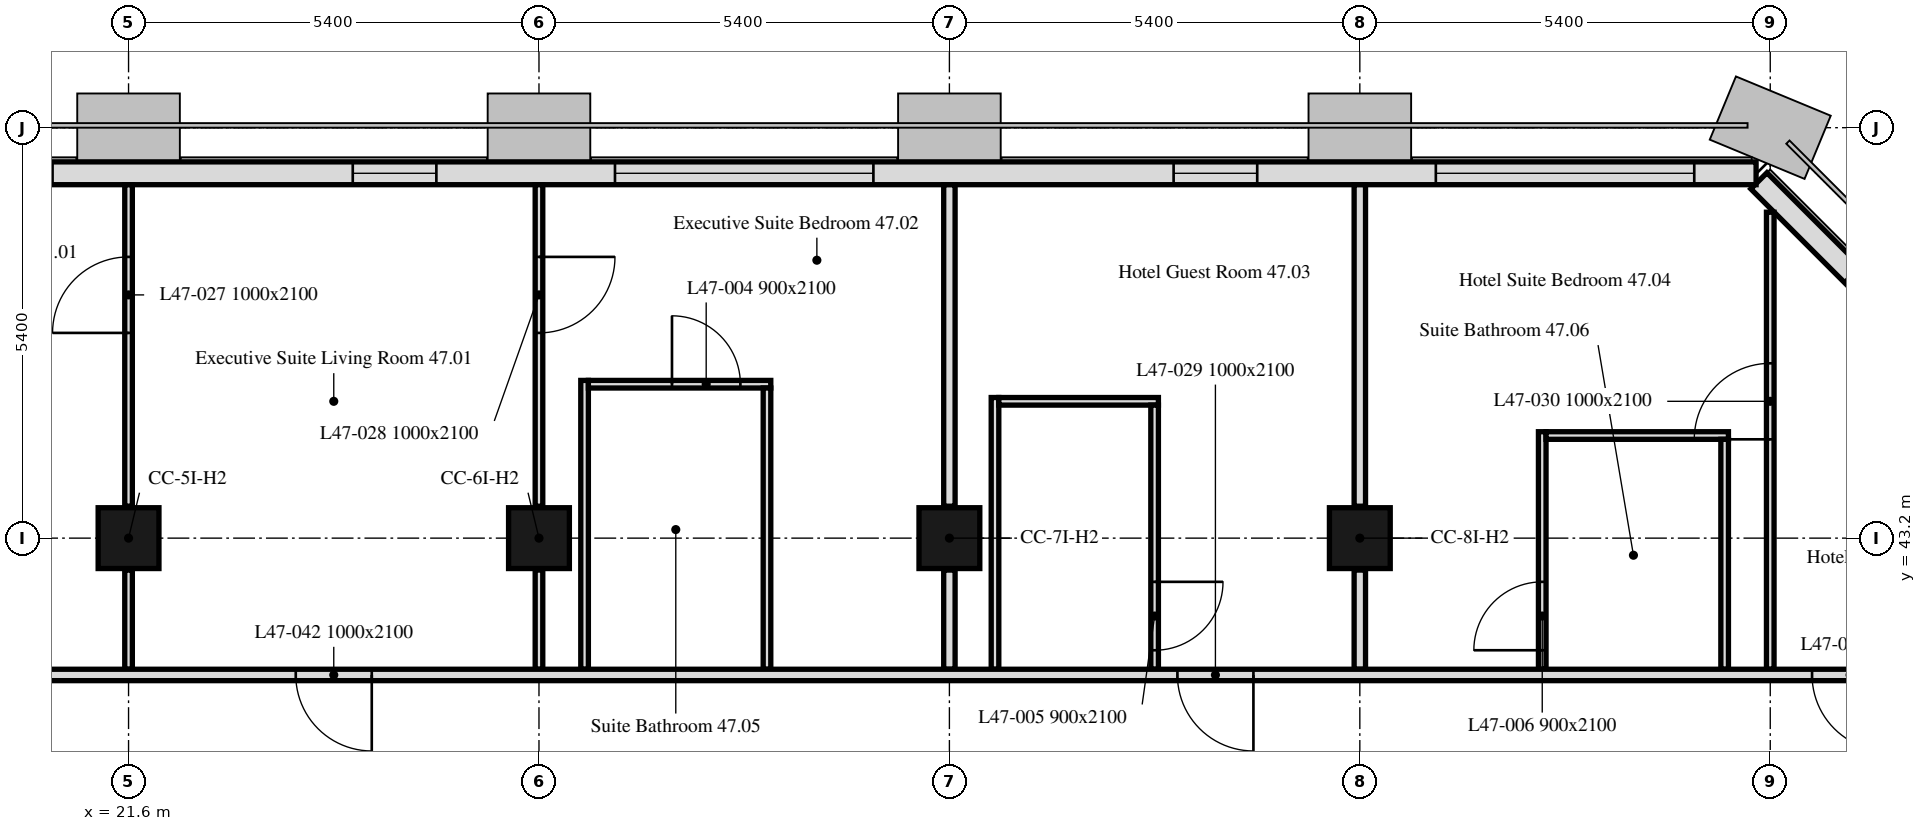
"""IFC4 building model, lengths in metres.
Left out: names, types, materials, properties, quantities, classifications, styles, units other than length and angle.
Written with IfcOpenShell. Run it as: python <this file> out.ifc"""

import sys

from ifc_helpers import new_model, si_unit, direction, frame, frame_2d, origin, origin_2d, place, context, subcontext, project, spatial, rectangle, extrude, element, fill, save


model = new_model("IFC4")
c1 = context("Model", 3, precision=1e-05, world=origin(), true_north=direction((0.0, 1.0)))
c2 = subcontext(c1, "Body", "Model", "MODEL_VIEW")
j1 = project(units=[si_unit("LENGTHUNIT", "METRE"), si_unit("PLANEANGLEUNIT", "RADIAN")], contexts=[c1])
p1 = place(None, origin())
s1 = spatial("IfcSite", under=j1, at=p1, CompositionType="ELEMENT")
p2 = place(p1, origin())
s2 = spatial("IfcBuilding", under=s1, at=p2, CompositionType="ELEMENT")
p3 = place(p2, frame((0.0, 0.0, 193.9)))
s3 = spatial("IfcBuildingStorey", under=s2, at=p3, CompositionType="ELEMENT", Elevation=193.9)
for number, where, z_axis, x_axis in (
    (1, (21.6, 43.2, 0.0), (0.0, 0.0, 1.0), (1.0, 0.0, 0.0)),
    (2, (27.0, 43.2, 0.0), (0.0, 0.0, 1.0), (1.0, 0.0, 0.0)),
    (3, (32.4, 43.2, 0.0), (0.0, 0.0, 1.0), (1.0, 0.0, 0.0)),
    (4, (37.8, 43.2, 0.0), (0.0, 0.0, 1.0), (1.0, 0.0, 0.0)),
):
    element("IfcColumn", number, at=place(p3, frame(where, z_axis=z_axis, x_axis=x_axis)), inside=s3, PredefinedType="COLUMN", context=c2, shape_type="SweptSolid", body=[
        extrude(rectangle(XDim=0.8, YDim=0.8, at=origin_2d()), origin(), (0.0, 0.0, 1.0), 3.0),
    ])
p4 = place(p3, frame((47.901, 43.051, 0.0), z_axis=(0.0, 0.0, 1.0), x_axis=(-0.707106781187, 0.707106781187, 0.0)))
e5 = element("IfcWall", 5, at=p4, inside=s3, PredefinedType="SOLIDWALL", context=c2, shape_type="SweptSolid", body=[
    extrude(rectangle(XDim=6.86, YDim=0.3, at=frame_2d((3.43, 0.0))), origin(), (0.0, 0.0, 1.0), 3.0),
])
p5 = place(p4, frame((1.73, 0.0, 0.9)))
e6 = element("IfcOpeningElement", 6, at=p5, cuts=e5, PredefinedType="OPENING", context=c2, shape_type="SweptSolid", body=[
    extrude(rectangle(XDim=3.4, YDim=1.7, at=frame_2d((1.7, 0.85))), frame((0.0, 0.16, 0.0), z_axis=(0.0, -1.0, 0.0), x_axis=(1.0, 0.0, 0.0)), (0.0, 0.0, 1.0), 0.32),
])
p6 = place(p3, frame((43.014, 48.0, 0.0), z_axis=(0.0, 0.0, 1.0), x_axis=(-1.0, 0.0, 0.0)))
e7 = element("IfcWall", 7, at=p6, inside=s3, PredefinedType="SOLIDWALL", context=c2, shape_type="SweptSolid", body=[
    extrude(rectangle(XDim=32.027, YDim=0.3, at=frame_2d((16.014, 0.0))), origin(), (0.0, 0.0, 1.0), 3.0),
])
p7 = place(p6, frame((0.814, 0.0, 0.9)))
e8 = element("IfcOpeningElement", 8, at=p7, cuts=e7, PredefinedType="OPENING", context=c2, shape_type="SweptSolid", body=[
    extrude(rectangle(XDim=3.4, YDim=1.7, at=frame_2d((1.7, 0.85))), frame((0.0, 0.16, 0.0), z_axis=(0.0, -1.0, 0.0), x_axis=(1.0, 0.0, 0.0)), (0.0, 0.0, 1.0), 0.32),
])
p8 = place(p6, frame((6.564, 0.0, 0.9)))
e9 = element("IfcOpeningElement", 9, at=p8, cuts=e7, PredefinedType="OPENING", context=c2, shape_type="SweptSolid", body=[
    extrude(rectangle(XDim=1.1, YDim=1.7, at=frame_2d((0.55, 0.85))), frame((0.0, 0.16, 0.0), z_axis=(0.0, -1.0, 0.0), x_axis=(1.0, 0.0, 0.0)), (0.0, 0.0, 1.0), 0.32),
])
p9 = place(p6, frame((11.614, 0.0, 0.9)))
e10 = element("IfcOpeningElement", 10, at=p9, cuts=e7, PredefinedType="OPENING", context=c2, shape_type="SweptSolid", body=[
    extrude(rectangle(XDim=3.4, YDim=1.7, at=frame_2d((1.7, 0.85))), frame((0.0, 0.16, 0.0), z_axis=(0.0, -1.0, 0.0), x_axis=(1.0, 0.0, 0.0)), (0.0, 0.0, 1.0), 0.32),
])
p10 = place(p6, frame((17.364, 0.0, 0.9)))
e11 = element("IfcOpeningElement", 11, at=p10, cuts=e7, PredefinedType="OPENING", context=c2, shape_type="SweptSolid", body=[
    extrude(rectangle(XDim=1.1, YDim=1.7, at=frame_2d((0.55, 0.85))), frame((0.0, 0.16, 0.0), z_axis=(0.0, -1.0, 0.0), x_axis=(1.0, 0.0, 0.0)), (0.0, 0.0, 1.0), 0.32),
])
p11 = place(p6, frame((22.414, 0.0, 0.9)))
e12 = element("IfcOpeningElement", 12, at=p11, cuts=e7, PredefinedType="OPENING", context=c2, shape_type="SweptSolid", body=[
    extrude(rectangle(XDim=3.4, YDim=1.7, at=frame_2d((1.7, 0.85))), frame((0.0, 0.16, 0.0), z_axis=(0.0, -1.0, 0.0), x_axis=(1.0, 0.0, 0.0)), (0.0, 0.0, 1.0), 0.32),
])
p12 = place(p6, frame((28.164, 0.0, 0.9)))
e13 = element("IfcOpeningElement", 13, at=p12, cuts=e7, PredefinedType="OPENING", context=c2, shape_type="SweptSolid", body=[
    extrude(rectangle(XDim=1.1, YDim=1.7, at=frame_2d((0.55, 0.85))), frame((0.0, 0.16, 0.0), z_axis=(0.0, -1.0, 0.0), x_axis=(1.0, 0.0, 0.0)), (0.0, 0.0, 1.0), 0.32),
])
p13 = place(p3, frame((21.6, 41.475, 0.0), z_axis=(0.0, 0.0, 1.0), x_axis=(0.0, 1.0, 0.0)))
e14 = element("IfcWall", 14, at=p13, inside=s3, PredefinedType="PARTITIONING", context=c2, shape_type="SweptSolid", body=[
    extrude(rectangle(XDim=1.305, YDim=0.1, at=frame_2d((0.652, 0.0))), origin(), (0.0, 0.0, 1.0), 2.4),
])
p14 = place(p3, frame((21.6, 43.62, 0.0), z_axis=(0.0, 0.0, 1.0), x_axis=(0.0, 1.0, 0.0)))
e15 = element("IfcWall", 15, at=p14, inside=s3, PredefinedType="PARTITIONING", context=c2, shape_type="SweptSolid", body=[
    extrude(rectangle(XDim=4.229, YDim=0.1, at=frame_2d((2.115, 0.0))), origin(), (0.0, 0.0, 1.0), 2.4),
])
p15 = place(p14, frame((2.28, 0.0, 0.0)))
e16 = element("IfcOpeningElement", 16, at=p15, cuts=e15, PredefinedType="OPENING", context=c2, shape_type="SweptSolid", body=[
    extrude(rectangle(XDim=1.0, YDim=2.1, at=frame_2d((0.5, 1.05))), frame((0.0, 0.05, 0.0), z_axis=(0.0, -1.0, 0.0), x_axis=(1.0, 0.0, 0.0)), (0.0, 0.0, 1.0), 0.1),
])
p16 = place(p3, frame((27.0, 47.849, 0.0), z_axis=(0.0, 0.0, 1.0), x_axis=(0.0, -1.0, 0.0)))
e17 = element("IfcWall", 17, at=p16, inside=s3, PredefinedType="PARTITIONING", context=c2, shape_type="SweptSolid", body=[
    extrude(rectangle(XDim=4.229, YDim=0.1, at=frame_2d((2.115, 0.0))), origin(), (0.0, 0.0, 1.0), 2.4),
])
p17 = place(p16, frame((0.949, 0.0, 0.0)))
e18 = element("IfcOpeningElement", 18, at=p17, cuts=e17, PredefinedType="OPENING", context=c2, shape_type="SweptSolid", body=[
    extrude(rectangle(XDim=1.0, YDim=2.1, at=frame_2d((0.5, 1.05))), frame((0.0, 0.05, 0.0), z_axis=(0.0, -1.0, 0.0), x_axis=(1.0, 0.0, 0.0)), (0.0, 0.0, 1.0), 0.1),
])
p18 = place(p3, frame((27.0, 42.78, 0.0), z_axis=(0.0, 0.0, 1.0), x_axis=(0.0, -1.0, 0.0)))
e19 = element("IfcWall", 19, at=p18, inside=s3, PredefinedType="PARTITIONING", context=c2, shape_type="SweptSolid", body=[
    extrude(rectangle(XDim=1.305, YDim=0.1, at=frame_2d((0.652, 0.0))), origin(), (0.0, 0.0, 1.0), 2.4),
])
p19 = place(p3, frame((27.6, 41.475, 0.0), z_axis=(0.0, 0.0, 1.0), x_axis=(0.0, 1.0, 0.0)))
e20 = element("IfcWall", 20, at=p19, inside=s3, PredefinedType="PARTITIONING", context=c2, shape_type="SweptSolid", body=[
    extrude(rectangle(XDim=3.8, YDim=0.1, at=frame_2d((1.9, 0.0))), origin(), (0.0, 0.0, 1.0), 3.0),
])
p20 = place(p3, frame((27.65, 45.225, 0.0), z_axis=(0.0, 0.0, 1.0), x_axis=(1.0, 0.0, 0.0)))
e21 = element("IfcWall", 21, at=p20, inside=s3, PredefinedType="PARTITIONING", context=c2, shape_type="SweptSolid", body=[
    extrude(rectangle(XDim=2.4, YDim=0.1, at=frame_2d((1.2, 0.0))), origin(), (0.0, 0.0, 1.0), 3.0),
])
p21 = place(p20, frame((1.1, 0.0, 0.0)))
e22 = element("IfcOpeningElement", 22, at=p21, cuts=e21, PredefinedType="OPENING", context=c2, shape_type="SweptSolid", body=[
    extrude(rectangle(XDim=0.9, YDim=2.1, at=frame_2d((0.45, 1.05))), frame((0.0, 0.05, 0.0), z_axis=(0.0, -1.0, 0.0), x_axis=(1.0, 0.0, 0.0)), (0.0, 0.0, 1.0), 0.1),
])
p22 = place(p3, frame((30.0, 45.175, 0.0), z_axis=(0.0, 0.0, 1.0), x_axis=(0.0, -1.0, 0.0)))
e23 = element("IfcWall", 23, at=p22, inside=s3, PredefinedType="PARTITIONING", context=c2, shape_type="SweptSolid", body=[
    extrude(rectangle(XDim=3.7, YDim=0.1, at=frame_2d((1.85, 0.0))), origin(), (0.0, 0.0, 1.0), 3.0),
])
p23 = place(p3, frame((32.4, 41.475, 0.0), z_axis=(0.0, 0.0, 1.0), x_axis=(0.0, 1.0, 0.0)))
e24 = element("IfcWall", 24, at=p23, inside=s3, PredefinedType="PARTITIONING", context=c2, shape_type="SweptSolid", body=[
    extrude(rectangle(XDim=1.305, YDim=0.15, at=frame_2d((0.652, 0.0))), origin(), (0.0, 0.0, 1.0), 2.4),
])
p24 = place(p3, frame((32.4, 43.62, 0.0), z_axis=(0.0, 0.0, 1.0), x_axis=(0.0, 1.0, 0.0)))
e25 = element("IfcWall", 25, at=p24, inside=s3, PredefinedType="PARTITIONING", context=c2, shape_type="SweptSolid", body=[
    extrude(rectangle(XDim=4.229, YDim=0.15, at=frame_2d((2.115, 0.0))), origin(), (0.0, 0.0, 1.0), 2.4),
])
p25 = place(p3, frame((33.0, 41.475, 0.0), z_axis=(0.0, 0.0, 1.0), x_axis=(0.0, 1.0, 0.0)))
e26 = element("IfcWall", 26, at=p25, inside=s3, PredefinedType="PARTITIONING", context=c2, shape_type="SweptSolid", body=[
    extrude(rectangle(XDim=3.575, YDim=0.1, at=frame_2d((1.788, 0.0))), origin(), (0.0, 0.0, 1.0), 3.0),
])
p26 = place(p3, frame((33.05, 45.0, 0.0), z_axis=(0.0, 0.0, 1.0), x_axis=(1.0, 0.0, 0.0)))
e27 = element("IfcWall", 27, at=p26, inside=s3, PredefinedType="PARTITIONING", context=c2, shape_type="SweptSolid", body=[
    extrude(rectangle(XDim=2.1, YDim=0.1, at=frame_2d((1.05, 0.0))), origin(), (0.0, 0.0, 1.0), 3.0),
])
p27 = place(p3, frame((35.1, 44.95, 0.0), z_axis=(0.0, 0.0, 1.0), x_axis=(0.0, -1.0, 0.0)))
e28 = element("IfcWall", 28, at=p27, inside=s3, PredefinedType="PARTITIONING", context=c2, shape_type="SweptSolid", body=[
    extrude(rectangle(XDim=3.475, YDim=0.1, at=frame_2d((1.737, 0.0))), origin(), (0.0, 0.0, 1.0), 3.0),
])
p28 = place(p27, frame((2.325, 0.0, 0.0)))
e29 = element("IfcOpeningElement", 29, at=p28, cuts=e28, PredefinedType="OPENING", context=c2, shape_type="SweptSolid", body=[
    extrude(rectangle(XDim=0.9, YDim=2.1, at=frame_2d((0.45, 1.05))), frame((0.0, 0.05, 0.0), z_axis=(0.0, -1.0, 0.0), x_axis=(1.0, 0.0, 0.0)), (0.0, 0.0, 1.0), 0.1),
])
p29 = place(p3, frame((37.8, 41.475, 0.0), z_axis=(0.0, 0.0, 1.0), x_axis=(0.0, 1.0, 0.0)))
e30 = element("IfcWall", 30, at=p29, inside=s3, PredefinedType="PARTITIONING", context=c2, shape_type="SweptSolid", body=[
    extrude(rectangle(XDim=1.305, YDim=0.15, at=frame_2d((0.652, 0.0))), origin(), (0.0, 0.0, 1.0), 2.4),
])
p30 = place(p3, frame((37.8, 43.62, 0.0), z_axis=(0.0, 0.0, 1.0), x_axis=(0.0, 1.0, 0.0)))
e31 = element("IfcWall", 31, at=p30, inside=s3, PredefinedType="PARTITIONING", context=c2, shape_type="SweptSolid", body=[
    extrude(rectangle(XDim=4.229, YDim=0.15, at=frame_2d((2.115, 0.0))), origin(), (0.0, 0.0, 1.0), 2.4),
])
p31 = place(p3, frame((40.2, 41.475, 0.0), z_axis=(0.0, 0.0, 1.0), x_axis=(0.0, 1.0, 0.0)))
e32 = element("IfcWall", 32, at=p31, inside=s3, PredefinedType="PARTITIONING", context=c2, shape_type="SweptSolid", body=[
    extrude(rectangle(XDim=3.125, YDim=0.1, at=frame_2d((1.562, 0.0))), origin(), (0.0, 0.0, 1.0), 3.0),
])
p32 = place(p31, frame((0.25, 0.0, 0.0)))
e33 = element("IfcOpeningElement", 33, at=p32, cuts=e32, PredefinedType="OPENING", context=c2, shape_type="SweptSolid", body=[
    extrude(rectangle(XDim=0.9, YDim=2.1, at=frame_2d((0.45, 1.05))), frame((0.0, 0.05, 0.0), z_axis=(0.0, -1.0, 0.0), x_axis=(1.0, 0.0, 0.0)), (0.0, 0.0, 1.0), 0.1),
])
p33 = place(p3, frame((40.25, 44.55, 0.0), z_axis=(0.0, 0.0, 1.0), x_axis=(1.0, 0.0, 0.0)))
e34 = element("IfcWall", 34, at=p33, inside=s3, PredefinedType="PARTITIONING", context=c2, shape_type="SweptSolid", body=[
    extrude(rectangle(XDim=2.4, YDim=0.1, at=frame_2d((1.2, 0.0))), origin(), (0.0, 0.0, 1.0), 3.0),
])
p34 = place(p3, frame((42.6, 44.5, 0.0), z_axis=(0.0, 0.0, 1.0), x_axis=(0.0, -1.0, 0.0)))
e35 = element("IfcWall", 35, at=p34, inside=s3, PredefinedType="PARTITIONING", context=c2, shape_type="SweptSolid", body=[
    extrude(rectangle(XDim=3.025, YDim=0.1, at=frame_2d((1.512, 0.0))), origin(), (0.0, 0.0, 1.0), 3.0),
])
p35 = place(p3, frame((43.2, 41.475, 0.0), z_axis=(0.0, 0.0, 1.0), x_axis=(0.0, 1.0, 0.0)))
e36 = element("IfcWall", 36, at=p35, inside=s3, PredefinedType="PARTITIONING", context=c2, shape_type="SweptSolid", body=[
    extrude(rectangle(XDim=6.013, YDim=0.1, at=frame_2d((3.006, 0.0))), origin(), (0.0, 0.0, 1.0), 3.0),
])
p36 = place(p35, frame((3.025, 0.0, 0.0)))
e37 = element("IfcOpeningElement", 37, at=p36, cuts=e36, PredefinedType="OPENING", context=c2, shape_type="SweptSolid", body=[
    extrude(rectangle(XDim=1.0, YDim=2.1, at=frame_2d((0.5, 1.05))), frame((0.0, 0.05, 0.0), z_axis=(0.0, -1.0, 0.0), x_axis=(1.0, 0.0, 0.0)), (0.0, 0.0, 1.0), 0.1),
])
p37 = place(p3, frame((47.849, 41.4, 0.0), z_axis=(0.0, 0.0, 1.0), x_axis=(-1.0, 0.0, 0.0)))
e38 = element("IfcWall", 38, at=p37, inside=s3, PredefinedType="PARTITIONING", context=c2, shape_type="SweptSolid", body=[
    extrude(rectangle(XDim=41.698, YDim=0.15, at=frame_2d((20.849, 0.0))), origin(), (0.0, 0.0, 1.0), 2.4),
])
p38 = place(p37, frame((39.249, 0.0, 0.0)))
e39 = element("IfcOpeningElement", 39, at=p38, cuts=e38, PredefinedType="OPENING", context=c2, shape_type="SweptSolid", body=[
    extrude(rectangle(XDim=1.0, YDim=2.1, at=frame_2d((0.5, 1.05))), frame((0.0, 0.075, 0.0), z_axis=(0.0, -1.0, 0.0), x_axis=(1.0, 0.0, 0.0)), (0.0, 0.0, 1.0), 0.15),
])
p39 = place(p37, frame((11.449, 0.0, 0.0)))
e40 = element("IfcOpeningElement", 40, at=p39, cuts=e38, PredefinedType="OPENING", context=c2, shape_type="SweptSolid", body=[
    extrude(rectangle(XDim=1.0, YDim=2.1, at=frame_2d((0.5, 1.05))), frame((0.0, 0.075, 0.0), z_axis=(0.0, -1.0, 0.0), x_axis=(1.0, 0.0, 0.0)), (0.0, 0.0, 1.0), 0.15),
])
p40 = place(p37, frame((3.099, 0.0, 0.0)))
e41 = element("IfcOpeningElement", 41, at=p40, cuts=e38, PredefinedType="OPENING", context=c2, shape_type="SweptSolid", body=[
    extrude(rectangle(XDim=1.0, YDim=2.1, at=frame_2d((0.5, 1.05))), frame((0.0, 0.075, 0.0), z_axis=(0.0, -1.0, 0.0), x_axis=(1.0, 0.0, 0.0)), (0.0, 0.0, 1.0), 0.15),
])
p41 = place(p37, frame((23.049, 0.0, 0.0)))
e42 = element("IfcOpeningElement", 42, at=p41, cuts=e38, PredefinedType="OPENING", context=c2, shape_type="SweptSolid", body=[
    extrude(rectangle(XDim=1.0, YDim=2.1, at=frame_2d((0.5, 1.05))), frame((0.0, 0.075, 0.0), z_axis=(0.0, -1.0, 0.0), x_axis=(1.0, 0.0, 0.0)), (0.0, 0.0, 1.0), 0.15),
])
p42 = place(p7, origin())
e43 = element("IfcWindow", 43, at=p42, inside=s3, PartitioningType="SINGLE_PANEL", PredefinedType="WINDOW", context=c2, shape_type="SweptSolid", body=[
    extrude(rectangle(XDim=3.4, YDim=1.7, at=frame_2d((1.7, 0.85))), frame((0.0, 0.03, 0.0), z_axis=(0.0, -1.0, 0.0), x_axis=(1.0, 0.0, 0.0)), (0.0, 0.0, 1.0), 0.06),
])
fill(e8, e43)
p43 = place(p8, origin())
e44 = element("IfcWindow", 44, at=p43, inside=s3, PartitioningType="SINGLE_PANEL", PredefinedType="WINDOW", context=c2, shape_type="SweptSolid", body=[
    extrude(rectangle(XDim=1.1, YDim=1.7, at=frame_2d((0.55, 0.85))), frame((0.0, 0.03, 0.0), z_axis=(0.0, -1.0, 0.0), x_axis=(1.0, 0.0, 0.0)), (0.0, 0.0, 1.0), 0.06),
])
fill(e9, e44)
p44 = place(p9, origin())
e45 = element("IfcWindow", 45, at=p44, inside=s3, PartitioningType="SINGLE_PANEL", PredefinedType="WINDOW", context=c2, shape_type="SweptSolid", body=[
    extrude(rectangle(XDim=3.4, YDim=1.7, at=frame_2d((1.7, 0.85))), frame((0.0, 0.03, 0.0), z_axis=(0.0, -1.0, 0.0), x_axis=(1.0, 0.0, 0.0)), (0.0, 0.0, 1.0), 0.06),
])
fill(e10, e45)
p45 = place(p10, origin())
e46 = element("IfcWindow", 46, at=p45, inside=s3, PartitioningType="SINGLE_PANEL", PredefinedType="WINDOW", context=c2, shape_type="SweptSolid", body=[
    extrude(rectangle(XDim=1.1, YDim=1.7, at=frame_2d((0.55, 0.85))), frame((0.0, 0.03, 0.0), z_axis=(0.0, -1.0, 0.0), x_axis=(1.0, 0.0, 0.0)), (0.0, 0.0, 1.0), 0.06),
])
fill(e11, e46)
p46 = place(p21, origin())
e47 = element("IfcDoor", 47, at=p46, inside=s3, OperationType="SINGLE_SWING_LEFT", PredefinedType="DOOR", context=c2, shape_type="SweptSolid", body=[
    extrude(rectangle(XDim=0.9, YDim=2.1, at=frame_2d((0.45, 1.05))), frame((0.0, 0.025, 0.0), z_axis=(0.0, -1.0, 0.0), x_axis=(1.0, 0.0, 0.0)), (0.0, 0.0, 1.0), 0.05),
])
fill(e22, e47)
p47 = place(p28, origin())
e48 = element("IfcDoor", 48, at=p47, inside=s3, OperationType="SINGLE_SWING_LEFT", PredefinedType="DOOR", context=c2, shape_type="SweptSolid", body=[
    extrude(rectangle(XDim=0.9, YDim=2.1, at=frame_2d((0.45, 1.05))), frame((0.0, 0.025, 0.0), z_axis=(0.0, -1.0, 0.0), x_axis=(1.0, 0.0, 0.0)), (0.0, 0.0, 1.0), 0.05),
])
fill(e29, e48)
p48 = place(p32, origin())
e49 = element("IfcDoor", 49, at=p48, inside=s3, OperationType="SINGLE_SWING_LEFT", PredefinedType="DOOR", context=c2, shape_type="SweptSolid", body=[
    extrude(rectangle(XDim=0.9, YDim=2.1, at=frame_2d((0.45, 1.05))), frame((0.0, 0.025, 0.0), z_axis=(0.0, -1.0, 0.0), x_axis=(1.0, 0.0, 0.0)), (0.0, 0.0, 1.0), 0.05),
])
fill(e33, e49)
p49 = place(p15, origin())
e50 = element("IfcDoor", 50, at=p49, inside=s3, OperationType="SINGLE_SWING_RIGHT", PredefinedType="DOOR", context=c2, shape_type="SweptSolid", body=[
    extrude(rectangle(XDim=1.0, YDim=2.1, at=frame_2d((0.5, 1.05))), frame((0.0, 0.025, 0.0), z_axis=(0.0, -1.0, 0.0), x_axis=(1.0, 0.0, 0.0)), (0.0, 0.0, 1.0), 0.05),
])
fill(e16, e50)
p50 = place(p17, origin())
e51 = element("IfcDoor", 51, at=p50, inside=s3, OperationType="SINGLE_SWING_RIGHT", PredefinedType="DOOR", context=c2, shape_type="SweptSolid", body=[
    extrude(rectangle(XDim=1.0, YDim=2.1, at=frame_2d((0.5, 1.05))), frame((0.0, 0.025, 0.0), z_axis=(0.0, -1.0, 0.0), x_axis=(1.0, 0.0, 0.0)), (0.0, 0.0, 1.0), 0.05),
])
fill(e18, e51)
p51 = place(p39, origin())
e52 = element("IfcDoor", 52, at=p51, inside=s3, OperationType="SINGLE_SWING_LEFT", PredefinedType="DOOR", context=c2, shape_type="SweptSolid", body=[
    extrude(rectangle(XDim=1.0, YDim=2.1, at=frame_2d((0.5, 1.05))), frame((0.0, 0.025, 0.0), z_axis=(0.0, -1.0, 0.0), x_axis=(1.0, 0.0, 0.0)), (0.0, 0.0, 1.0), 0.05),
])
fill(e40, e52)
p52 = place(p36, origin())
e53 = element("IfcDoor", 53, at=p52, inside=s3, OperationType="SINGLE_SWING_LEFT", PredefinedType="DOOR", context=c2, shape_type="SweptSolid", body=[
    extrude(rectangle(XDim=1.0, YDim=2.1, at=frame_2d((0.5, 1.05))), frame((0.0, 0.025, 0.0), z_axis=(0.0, -1.0, 0.0), x_axis=(1.0, 0.0, 0.0)), (0.0, 0.0, 1.0), 0.05),
])
fill(e37, e53)
p53 = place(p40, origin())
e54 = element("IfcDoor", 54, at=p53, inside=s3, OperationType="SINGLE_SWING_LEFT", PredefinedType="DOOR", context=c2, shape_type="SweptSolid", body=[
    extrude(rectangle(XDim=1.0, YDim=2.1, at=frame_2d((0.5, 1.05))), frame((0.0, 0.025, 0.0), z_axis=(0.0, -1.0, 0.0), x_axis=(1.0, 0.0, 0.0)), (0.0, 0.0, 1.0), 0.05),
])
fill(e41, e54)
p54 = place(p41, origin())
e55 = element("IfcDoor", 55, at=p54, inside=s3, OperationType="SINGLE_SWING_RIGHT", PredefinedType="DOOR", context=c2, shape_type="SweptSolid", body=[
    extrude(rectangle(XDim=1.0, YDim=2.1, at=frame_2d((0.5, 1.05))), frame((0.0, 0.025, 0.0), z_axis=(0.0, -1.0, 0.0), x_axis=(1.0, 0.0, 0.0)), (0.0, 0.0, 1.0), 0.05),
])
fill(e42, e55)
save(model, sys.argv[1])
